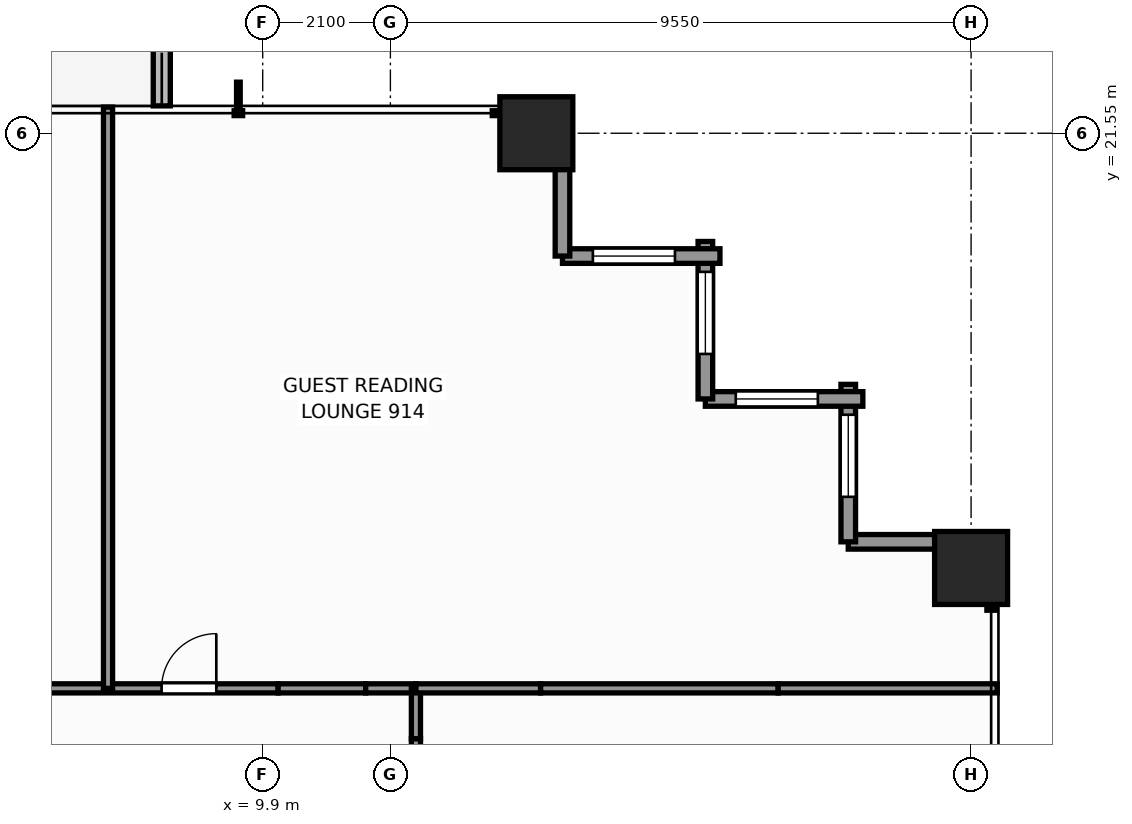
"""IFC4 building model, lengths in metres.
Left out: names, types, materials, properties, quantities, classifications, styles, units other than length and angle.
Written with IfcOpenShell. Run it as: python <this file> out.ifc"""

import sys

from ifc_helpers import new_model, si_unit, direction, frame, frame_2d, origin, origin_2d, place, context, subcontext, project, spatial, rectangle, extrude, element, fill, save


model = new_model("IFC4")
c1 = context("Model", 3, precision=1e-05, world=origin(), true_north=direction((0.0, 1.0)))
c2 = subcontext(c1, "Body", "Model", "MODEL_VIEW")
j1 = project(units=[si_unit("LENGTHUNIT", "METRE"), si_unit("PLANEANGLEUNIT", "RADIAN")], contexts=[c1])
p1 = place(None, origin())
s1 = spatial("IfcSite", under=j1, at=p1, CompositionType="ELEMENT")
p2 = place(p1, origin())
s2 = spatial("IfcBuilding", under=s1, at=p2, CompositionType="ELEMENT")
p3 = place(p2, frame((0.0, 0.0, 33.7)))
s3 = spatial("IfcBuildingStorey", under=s2, at=p3, CompositionType="ELEMENT", Elevation=33.7)
for number, where, z_axis, x_axis in (
    (1, (14.4, 21.55, 0.0), (0.0, 0.0, 1.0), (1.0, 0.0, 0.0)),
    (2, (21.55, 14.4, 0.0), (0.0, 0.0, 1.0), (1.0, 0.0, 0.0)),
):
    element("IfcColumn", number, at=place(p3, frame(where, z_axis=z_axis, x_axis=x_axis)), inside=s3, PredefinedType="COLUMN", context=c2, shape_type="SweptSolid", body=[
        extrude(rectangle(XDim=1.2, YDim=1.2, at=origin_2d()), origin(), (0.0, 0.0, 1.0), 3.3),
    ])
p4 = place(p3, frame((8.24, 22.0, -0.06), z_axis=(0.0, 0.0, 1.0), x_axis=(0.0, 1.0, 0.0)))
e3 = element("IfcWall", 3, at=p4, inside=s3, PredefinedType="PARAPET", context=c2, shape_type="SweptSolid", body=[
    extrude(rectangle(XDim=3.3, YDim=0.28, at=frame_2d((1.65, 0.0))), origin(), (0.0, 0.0, 1.0), 0.42),
])
p5 = place(p3, frame((19.53, 14.83, 0.0), z_axis=(0.0, 0.0, 1.0), x_axis=(1.0, 0.0, 0.0)))
e4 = element("IfcWall", 4, at=p5, inside=s3, PredefinedType="STANDARD", context=c2, shape_type="SweptSolid", body=[
    extrude(rectangle(XDim=2.59, YDim=0.24, at=frame_2d((1.295, 0.0))), origin(), (0.0, 0.0, 1.0), 1.955),
])
p6 = place(p3, frame((19.53, 17.42, 0.0), z_axis=(0.0, 0.0, 1.0), x_axis=(0.0, -1.0, 0.0)))
e5 = element("IfcWall", 5, at=p6, inside=s3, PredefinedType="STANDARD", context=c2, shape_type="SweptSolid", body=[
    extrude(rectangle(XDim=2.59, YDim=0.24, at=frame_2d((1.295, 0.0))), origin(), (0.0, 0.0, 1.0), 2.439),
])
p7 = place(p6, frame((0.5, 0.0, 0.65)))
e6 = element("IfcOpeningElement", 6, at=p7, cuts=e5, PredefinedType="OPENING", context=c2, shape_type="SweptSolid", body=[
    extrude(rectangle(XDim=1.35, YDim=1.55, at=frame_2d((0.675, 0.775))), frame((0.0, 0.13, 0.0), z_axis=(0.0, -1.0, 0.0), x_axis=(1.0, 0.0, 0.0)), (0.0, 0.0, 1.0), 0.26),
])
p8 = place(p3, frame((17.18, 17.18, 0.0), z_axis=(0.0, 0.0, 1.0), x_axis=(1.0, 0.0, 0.0)))
e7 = element("IfcWall", 7, at=p8, inside=s3, PredefinedType="STANDARD", context=c2, shape_type="SweptSolid", body=[
    extrude(rectangle(XDim=2.59, YDim=0.24, at=frame_2d((1.295, 0.0))), origin(), (0.0, 0.0, 1.0), 2.439),
])
p9 = place(p8, frame((0.5, 0.0, 0.65)))
e8 = element("IfcOpeningElement", 8, at=p9, cuts=e7, PredefinedType="OPENING", context=c2, shape_type="SweptSolid", body=[
    extrude(rectangle(XDim=1.35, YDim=1.55, at=frame_2d((0.675, 0.775))), frame((0.0, 0.13, 0.0), z_axis=(0.0, -1.0, 0.0), x_axis=(1.0, 0.0, 0.0)), (0.0, 0.0, 1.0), 0.26),
])
p10 = place(p3, frame((17.18, 19.77, 0.0), z_axis=(0.0, 0.0, 1.0), x_axis=(0.0, -1.0, 0.0)))
e9 = element("IfcWall", 9, at=p10, inside=s3, PredefinedType="STANDARD", context=c2, shape_type="SweptSolid", body=[
    extrude(rectangle(XDim=2.59, YDim=0.24, at=frame_2d((1.295, 0.0))), origin(), (0.0, 0.0, 1.0), 2.439),
])
p11 = place(p10, frame((0.5, 0.0, 0.65)))
e10 = element("IfcOpeningElement", 10, at=p11, cuts=e9, PredefinedType="OPENING", context=c2, shape_type="SweptSolid", body=[
    extrude(rectangle(XDim=1.35, YDim=1.55, at=frame_2d((0.675, 0.775))), frame((0.0, 0.13, 0.0), z_axis=(0.0, -1.0, 0.0), x_axis=(1.0, 0.0, 0.0)), (0.0, 0.0, 1.0), 0.26),
])
p12 = place(p3, frame((14.83, 19.53, 0.0), z_axis=(0.0, 0.0, 1.0), x_axis=(1.0, 0.0, 0.0)))
e11 = element("IfcWall", 11, at=p12, inside=s3, PredefinedType="STANDARD", context=c2, shape_type="SweptSolid", body=[
    extrude(rectangle(XDim=2.59, YDim=0.24, at=frame_2d((1.295, 0.0))), origin(), (0.0, 0.0, 1.0), 2.439),
])
p13 = place(p12, frame((0.5, 0.0, 0.65)))
e12 = element("IfcOpeningElement", 12, at=p13, cuts=e11, PredefinedType="OPENING", context=c2, shape_type="SweptSolid", body=[
    extrude(rectangle(XDim=1.35, YDim=1.55, at=frame_2d((0.675, 0.775))), frame((0.0, 0.13, 0.0), z_axis=(0.0, -1.0, 0.0), x_axis=(1.0, 0.0, 0.0)), (0.0, 0.0, 1.0), 0.26),
])
p14 = place(p3, frame((14.83, 22.12, 0.0), z_axis=(0.0, 0.0, 1.0), x_axis=(0.0, -1.0, 0.0)))
e13 = element("IfcWall", 13, at=p14, inside=s3, PredefinedType="STANDARD", context=c2, shape_type="SweptSolid", body=[
    extrude(rectangle(XDim=2.59, YDim=0.24, at=frame_2d((1.295, 0.0))), origin(), (0.0, 0.0, 1.0), 1.955),
])
p15 = place(p3, frame((5.242, 12.42, 0.0), z_axis=(0.0, 0.0, 1.0), x_axis=(1.0, 0.0, 0.0)))
e14 = element("IfcWall", 14, at=p15, inside=s3, PredefinedType="PARTITIONING", context=c2, shape_type="SweptSolid", body=[
    extrude(rectangle(XDim=4.912, YDim=0.15, at=frame_2d((2.456, 0.0))), origin(), (0.0, 0.0, 1.0), 3.06),
])
p16 = place(p15, frame((2.995, 0.0, 0.0)))
e15 = element("IfcOpeningElement", 15, at=p16, cuts=e14, PredefinedType="OPENING", context=c2, shape_type="SweptSolid", body=[
    extrude(rectangle(XDim=0.9, YDim=2.06, at=frame_2d((0.45, 1.03))), frame((0.0, 0.085, 0.0), z_axis=(0.0, -1.0, 0.0), x_axis=(1.0, 0.0, 0.0)), (0.0, 0.0, 1.0), 0.17),
])
p17 = place(p3, frame((10.154, 12.42, 0.0), z_axis=(0.0, 0.0, 1.0), x_axis=(1.0, 0.0, 0.0)))
e16 = element("IfcWall", 16, at=p17, inside=s3, PredefinedType="PARTITIONING", context=c2, shape_type="SweptSolid", body=[
    extrude(rectangle(XDim=1.439, YDim=0.15, at=frame_2d((0.72, 0.0))), origin(), (0.0, 0.0, 1.0), 1.945),
])
p18 = place(p3, frame((11.593, 12.42, 0.0), z_axis=(0.0, 0.0, 1.0), x_axis=(1.0, 0.0, 0.0)))
e17 = element("IfcWall", 17, at=p18, inside=s3, PredefinedType="PARTITIONING", context=c2, shape_type="SweptSolid", body=[
    extrude(rectangle(XDim=0.827, YDim=0.15, at=frame_2d((0.414, 0.0))), origin(), (0.0, 0.0, 1.0), 3.06),
])
p19 = place(p3, frame((12.42, 10.154, 0.0), z_axis=(0.0, 0.0, 1.0), x_axis=(0.0, 1.0, 0.0)))
e18 = element("IfcWall", 18, at=p19, inside=s3, PredefinedType="PARTITIONING", context=c2, shape_type="SweptSolid", body=[
    extrude(rectangle(XDim=1.439, YDim=0.15, at=frame_2d((0.72, 0.0))), origin(), (0.0, 0.0, 1.0), 1.945),
])
p20 = place(p3, frame((12.42, 11.593, 0.0), z_axis=(0.0, 0.0, 1.0), x_axis=(0.0, 1.0, 0.0)))
e19 = element("IfcWall", 19, at=p20, inside=s3, PredefinedType="PARTITIONING", context=c2, shape_type="SweptSolid", body=[
    extrude(rectangle(XDim=0.827, YDim=0.15, at=frame_2d((0.414, 0.0))), origin(), (0.0, 0.0, 1.0), 3.06),
])
p21 = place(p3, frame((12.42, 12.42, 0.0), z_axis=(0.0, 0.0, 1.0), x_axis=(1.0, 0.0, 0.0)))
e20 = element("IfcWall", 20, at=p21, inside=s3, PredefinedType="PARTITIONING", context=c2, shape_type="SweptSolid", body=[
    extrude(rectangle(XDim=2.05, YDim=0.15, at=frame_2d((1.025, 0.0))), origin(), (0.0, 0.0, 1.0), 3.06),
])
p22 = place(p3, frame((14.47, 12.42, 0.0), z_axis=(0.0, 0.0, 1.0), x_axis=(1.0, 0.0, 0.0)))
e21 = element("IfcWall", 21, at=p22, inside=s3, PredefinedType="PARTITIONING", context=c2, shape_type="SweptSolid", body=[
    extrude(rectangle(XDim=3.907, YDim=0.15, at=frame_2d((1.954, 0.0))), origin(), (0.0, 0.0, 1.0), 1.945),
])
p23 = place(p3, frame((18.378, 12.42, 0.0), z_axis=(0.0, 0.0, 1.0), x_axis=(1.0, 0.0, 0.0)))
e22 = element("IfcWall", 22, at=p23, inside=s3, PredefinedType="PARTITIONING", context=c2, shape_type="SweptSolid", body=[
    extrude(rectangle(XDim=3.602, YDim=0.15, at=frame_2d((1.801, 0.0))), origin(), (0.0, 0.0, 1.0), 2.429),
])
p24 = place(p3, frame((7.356, 12.42, 0.0), z_axis=(0.0, 0.0, 1.0), x_axis=(0.0, 1.0, 0.0)))
e23 = element("IfcWall", 23, at=p24, inside=s3, PredefinedType="PARTITIONING", context=c2, shape_type="SweptSolid", body=[
    extrude(rectangle(XDim=9.56, YDim=0.15, at=frame_2d((4.78, 0.0))), origin(), (0.0, 0.0, 1.0), 2.429),
])
p25 = place(p7, origin())
e24 = element("IfcWindow", 24, at=p25, inside=s3, PartitioningType="SINGLE_PANEL", PredefinedType="WINDOW", context=c2, shape_type="SweptSolid", body=[
    extrude(rectangle(XDim=1.35, YDim=1.55, at=frame_2d((0.675, 0.775))), frame((0.0, 0.03, 0.0), z_axis=(0.0, -1.0, 0.0), x_axis=(1.0, 0.0, 0.0)), (0.0, 0.0, 1.0), 0.06),
])
fill(e6, e24)
p26 = place(p9, origin())
e25 = element("IfcWindow", 25, at=p26, inside=s3, PartitioningType="SINGLE_PANEL", PredefinedType="WINDOW", context=c2, shape_type="SweptSolid", body=[
    extrude(rectangle(XDim=1.35, YDim=1.55, at=frame_2d((0.675, 0.775))), frame((0.0, 0.03, 0.0), z_axis=(0.0, -1.0, 0.0), x_axis=(1.0, 0.0, 0.0)), (0.0, 0.0, 1.0), 0.06),
])
fill(e8, e25)
p27 = place(p11, origin())
e26 = element("IfcWindow", 26, at=p27, inside=s3, PartitioningType="SINGLE_PANEL", PredefinedType="WINDOW", context=c2, shape_type="SweptSolid", body=[
    extrude(rectangle(XDim=1.35, YDim=1.55, at=frame_2d((0.675, 0.775))), frame((0.0, 0.03, 0.0), z_axis=(0.0, -1.0, 0.0), x_axis=(1.0, 0.0, 0.0)), (0.0, 0.0, 1.0), 0.06),
])
fill(e10, e26)
p28 = place(p13, origin())
e27 = element("IfcWindow", 27, at=p28, inside=s3, PartitioningType="SINGLE_PANEL", PredefinedType="WINDOW", context=c2, shape_type="SweptSolid", body=[
    extrude(rectangle(XDim=1.35, YDim=1.55, at=frame_2d((0.675, 0.775))), frame((0.0, 0.03, 0.0), z_axis=(0.0, -1.0, 0.0), x_axis=(1.0, 0.0, 0.0)), (0.0, 0.0, 1.0), 0.06),
])
fill(e12, e27)
p29 = place(p16, origin())
e28 = element("IfcDoor", 28, at=p29, inside=s3, OperationType="SINGLE_SWING_RIGHT", PredefinedType="DOOR", context=c2, shape_type="SweptSolid", body=[
    extrude(rectangle(XDim=0.9, YDim=2.06, at=frame_2d((0.45, 1.03))), frame((0.0, 0.025, 0.0), z_axis=(0.0, -1.0, 0.0), x_axis=(1.0, 0.0, 0.0)), (0.0, 0.0, 1.0), 0.05),
])
fill(e15, e28)
save(model, sys.argv[1])
